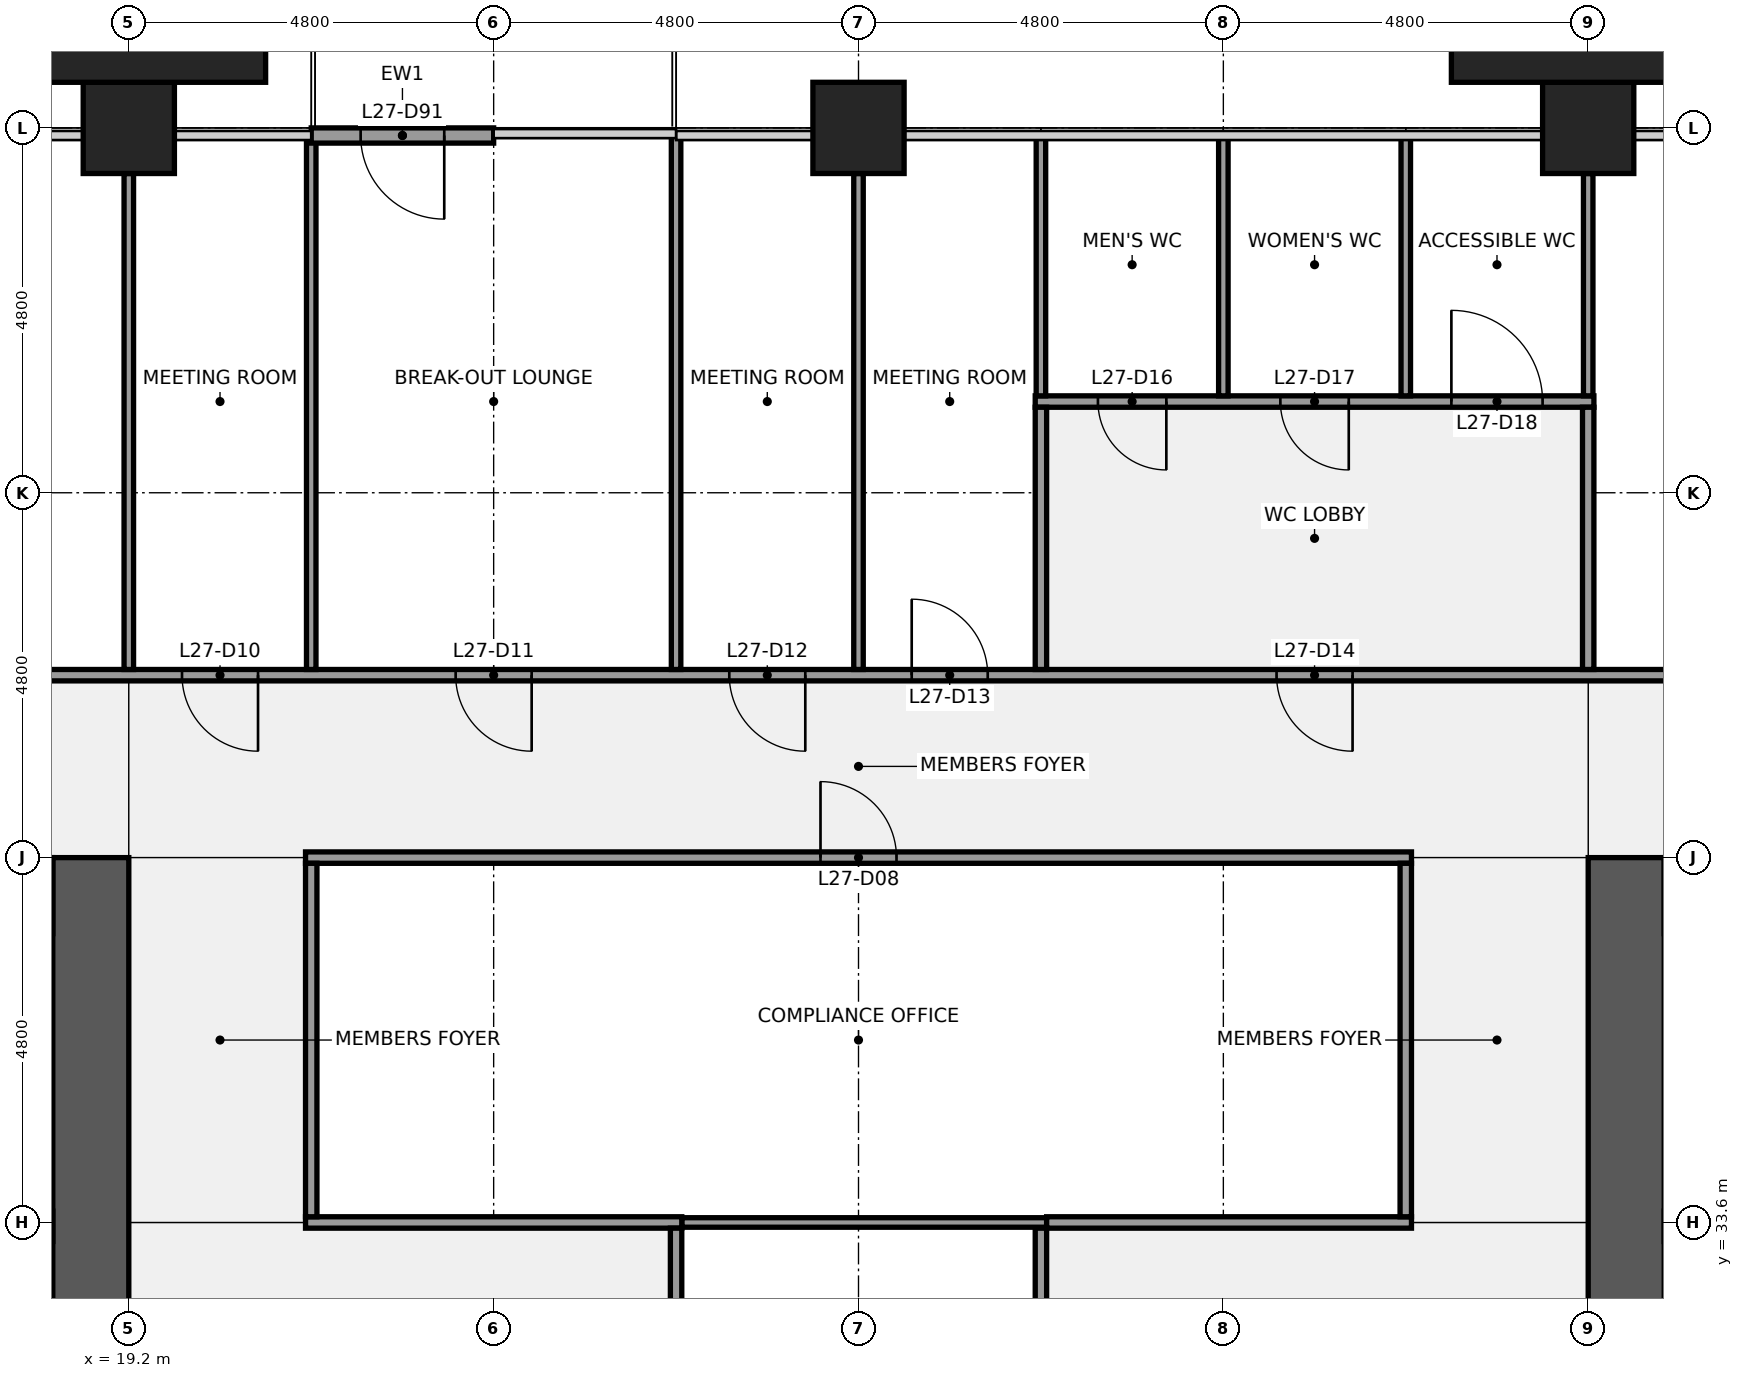
"""IFC4 building model, lengths in metres.
Left out: names, types, materials, properties, quantities, classifications, styles, units other than length and angle.
Written with IfcOpenShell. Run it as: python <this file> out.ifc"""

import sys

from ifc_helpers import new_model, si_unit, direction, frame, frame_2d, origin, origin_2d, place, context, subcontext, project, spatial, rectangle, extrude, element, fill, save


model = new_model("IFC4")
c1 = context("Model", 3, precision=1e-05, world=origin(), true_north=direction((0.0, 1.0)))
c2 = subcontext(c1, "Body", "Model", "MODEL_VIEW")
j1 = project(units=[si_unit("LENGTHUNIT", "METRE"), si_unit("PLANEANGLEUNIT", "RADIAN")], contexts=[c1])
p1 = place(None, origin())
s1 = spatial("IfcSite", under=j1, at=p1, CompositionType="ELEMENT")
p2 = place(p1, origin())
s2 = spatial("IfcBuilding", under=s1, at=p2, CompositionType="ELEMENT")
p3 = place(p2, frame((0.0, 0.0, 128.1)))
s3 = spatial("IfcBuildingStorey", under=s2, at=p3, CompositionType="ELEMENT", Elevation=128.1)
for number, where, z_axis, x_axis in (
    (1, (19.2, 48.0, 0.0), (0.0, 0.0, 1.0), (1.0, 0.0, 0.0)),
    (2, (28.8, 48.0, 0.0), (0.0, 0.0, 1.0), (1.0, 0.0, 0.0)),
    (3, (38.4, 48.0, 0.0), (0.0, 0.0, 1.0), (1.0, 0.0, 0.0)),
):
    element("IfcColumn", number, at=place(p3, frame(where, z_axis=z_axis, x_axis=x_axis)), inside=s3, PredefinedType="COLUMN", context=c2, shape_type="SweptSolid", body=[
        extrude(rectangle(XDim=1.2, YDim=1.2, at=origin_2d()), origin(), (0.0, 0.0, 1.0), 4.0),
    ])
p4 = place(p3, frame((18.7, 38.4, 0.0), z_axis=(0.0, 0.0, 1.0), x_axis=(0.0, -1.0, 0.0)))
e4 = element("IfcWall", 4, at=p4, inside=s3, PredefinedType="SHEAR", context=c2, shape_type="SweptSolid", body=[
    extrude(rectangle(XDim=28.8, YDim=1.0, at=frame_2d((14.4, 0.0))), origin(), (0.0, 0.0, 1.0), 3.84),
])
p5 = place(p4, frame((18.3, 0.0, 0.0)))
e5 = element("IfcOpeningElement", 5, at=p5, cuts=e4, PredefinedType="OPENING", context=c2, shape_type="SweptSolid", body=[
    extrude(rectangle(XDim=1.8, YDim=2.1, at=frame_2d((0.9, 1.05))), frame((0.0, 0.51, 0.0), z_axis=(0.0, -1.0, 0.0), x_axis=(1.0, 0.0, 0.0)), (0.0, 0.0, 1.0), 1.02),
])
p6 = place(p4, frame((8.7, 0.0, 0.0)))
e6 = element("IfcOpeningElement", 6, at=p6, cuts=e4, PredefinedType="OPENING", context=c2, shape_type="SweptSolid", body=[
    extrude(rectangle(XDim=1.8, YDim=2.1, at=frame_2d((0.9, 1.05))), frame((0.0, 0.51, 0.0), z_axis=(0.0, -1.0, 0.0), x_axis=(1.0, 0.0, 0.0)), (0.0, 0.0, 1.0), 1.02),
])
p7 = place(p3, frame((1.0, 33.55, 0.0), z_axis=(0.0, 0.0, 1.0), x_axis=(1.0, 0.0, 0.0)))
e7 = element("IfcWall", 7, at=p7, inside=s3, PredefinedType="SHEAR", context=c2, shape_type="SweptSolid", body=[
    extrude(rectangle(XDim=17.2, YDim=0.4, at=frame_2d((8.6, 0.0))), origin(), (0.0, 0.0, 1.0), 3.84),
])
p8 = place(p3, frame((38.9, 9.6, 0.0), z_axis=(0.0, 0.0, 1.0), x_axis=(0.0, 1.0, 0.0)))
e8 = element("IfcWall", 8, at=p8, inside=s3, PredefinedType="SHEAR", context=c2, shape_type="SweptSolid", body=[
    extrude(rectangle(XDim=28.8, YDim=1.0, at=frame_2d((14.4, 0.0))), origin(), (0.0, 0.0, 1.0), 3.84),
])
p9 = place(p8, frame((8.7, 0.0, 0.0)))
e9 = element("IfcOpeningElement", 9, at=p9, cuts=e8, PredefinedType="OPENING", context=c2, shape_type="SweptSolid", body=[
    extrude(rectangle(XDim=1.8, YDim=2.1, at=frame_2d((0.9, 1.05))), frame((0.0, 0.51, 0.0), z_axis=(0.0, -1.0, 0.0), x_axis=(1.0, 0.0, 0.0)), (0.0, 0.0, 1.0), 1.02),
])
p10 = place(p8, frame((18.3, 0.0, 0.0)))
e10 = element("IfcOpeningElement", 10, at=p10, cuts=e8, PredefinedType="OPENING", context=c2, shape_type="SweptSolid", body=[
    extrude(rectangle(XDim=1.8, YDim=2.1, at=frame_2d((0.9, 1.05))), frame((0.0, 0.51, 0.0), z_axis=(0.0, -1.0, 0.0), x_axis=(1.0, 0.0, 0.0)), (0.0, 0.0, 1.0), 1.02),
])
p11 = place(p3, frame((26.475, 33.6, 0.0), z_axis=(0.0, 0.0, 1.0), x_axis=(1.0, 0.0, 0.0)))
e11 = element("IfcWall", 11, at=p11, inside=s3, PredefinedType="PARTITIONING", context=c2, shape_type="SweptSolid", body=[
    extrude(rectangle(XDim=4.8, YDim=0.125, at=frame_2d((2.4, 0.0))), origin(), (0.0, 0.0, 1.0), 2.936),
])
p12 = place(p3, frame((21.525, 33.6, 0.0), z_axis=(0.0, 0.0, 1.0), x_axis=(1.0, 0.0, 0.0)))
e12 = element("IfcWall", 12, at=p12, inside=s3, PredefinedType="PARTITIONING", context=c2, shape_type="SweptSolid", body=[
    extrude(rectangle(XDim=4.95, YDim=0.15, at=frame_2d((2.475, 0.0))), origin(), (0.0, 0.0, 1.0), 2.936),
])
p13 = place(p3, frame((31.275, 33.6, 0.0), z_axis=(0.0, 0.0, 1.0), x_axis=(1.0, 0.0, 0.0)))
e13 = element("IfcWall", 13, at=p13, inside=s3, PredefinedType="PARTITIONING", context=c2, shape_type="SweptSolid", body=[
    extrude(rectangle(XDim=4.8, YDim=0.15, at=frame_2d((2.4, 0.0))), origin(), (0.0, 0.0, 1.0), 2.936),
])
p14 = place(p3, frame((21.525, 38.4, 0.0), z_axis=(0.0, 0.0, 1.0), x_axis=(1.0, 0.0, 0.0)))
e14 = element("IfcWall", 14, at=p14, inside=s3, PredefinedType="PARTITIONING", context=c2, shape_type="SweptSolid", body=[
    extrude(rectangle(XDim=14.55, YDim=0.15, at=frame_2d((7.275, 0.0))), origin(), (0.0, 0.0, 1.0), 2.936),
])
p15 = place(p14, frame((6.775, 0.0, 0.0)))
e15 = element("IfcOpeningElement", 15, at=p15, cuts=e14, PredefinedType="OPENING", context=c2, shape_type="SweptSolid", body=[
    extrude(rectangle(XDim=1.0, YDim=2.1, at=frame_2d((0.5, 1.05))), frame((0.0, 0.085, 0.0), z_axis=(0.0, -1.0, 0.0), x_axis=(1.0, 0.0, 0.0)), (0.0, 0.0, 1.0), 0.17),
])
p16 = place(p3, frame((14.325, 40.8, 0.0), z_axis=(0.0, 0.0, 1.0), x_axis=(1.0, 0.0, 0.0)))
e16 = element("IfcWall", 16, at=p16, inside=s3, PredefinedType="PARTITIONING", context=c2, shape_type="SweptSolid", body=[
    extrude(rectangle(XDim=28.95, YDim=0.15, at=frame_2d((14.475, 0.0))), origin(), (0.0, 0.0, 1.0), 2.936),
])
p17 = place(p16, frame((1.975, 0.0, 0.0)))
e17 = element("IfcOpeningElement", 17, at=p17, cuts=e16, PredefinedType="OPENING", context=c2, shape_type="SweptSolid", body=[
    extrude(rectangle(XDim=1.0, YDim=2.1, at=frame_2d((0.5, 1.05))), frame((0.0, 0.085, 0.0), z_axis=(0.0, -1.0, 0.0), x_axis=(1.0, 0.0, 0.0)), (0.0, 0.0, 1.0), 0.17),
])
p18 = place(p16, frame((5.575, 0.0, 0.0)))
e18 = element("IfcOpeningElement", 18, at=p18, cuts=e16, PredefinedType="OPENING", context=c2, shape_type="SweptSolid", body=[
    extrude(rectangle(XDim=1.0, YDim=2.1, at=frame_2d((0.5, 1.05))), frame((0.0, 0.085, 0.0), z_axis=(0.0, -1.0, 0.0), x_axis=(1.0, 0.0, 0.0)), (0.0, 0.0, 1.0), 0.17),
])
p19 = place(p16, frame((9.175, 0.0, 0.0)))
e19 = element("IfcOpeningElement", 19, at=p19, cuts=e16, PredefinedType="OPENING", context=c2, shape_type="SweptSolid", body=[
    extrude(rectangle(XDim=1.0, YDim=2.1, at=frame_2d((0.5, 1.05))), frame((0.0, 0.085, 0.0), z_axis=(0.0, -1.0, 0.0), x_axis=(1.0, 0.0, 0.0)), (0.0, 0.0, 1.0), 0.17),
])
p20 = place(p16, frame((12.775, 0.0, 0.0)))
e20 = element("IfcOpeningElement", 20, at=p20, cuts=e16, PredefinedType="OPENING", context=c2, shape_type="SweptSolid", body=[
    extrude(rectangle(XDim=1.0, YDim=2.1, at=frame_2d((0.5, 1.05))), frame((0.0, 0.085, 0.0), z_axis=(0.0, -1.0, 0.0), x_axis=(1.0, 0.0, 0.0)), (0.0, 0.0, 1.0), 0.17),
])
p21 = place(p16, frame((15.175, 0.0, 0.0)))
e21 = element("IfcOpeningElement", 21, at=p21, cuts=e16, PredefinedType="OPENING", context=c2, shape_type="SweptSolid", body=[
    extrude(rectangle(XDim=1.0, YDim=2.1, at=frame_2d((0.5, 1.05))), frame((0.0, 0.085, 0.0), z_axis=(0.0, -1.0, 0.0), x_axis=(1.0, 0.0, 0.0)), (0.0, 0.0, 1.0), 0.17),
])
p22 = place(p16, frame((19.975, 0.0, 0.0)))
e22 = element("IfcOpeningElement", 22, at=p22, cuts=e16, PredefinedType="OPENING", context=c2, shape_type="SweptSolid", body=[
    extrude(rectangle(XDim=1.0, YDim=2.1, at=frame_2d((0.5, 1.05))), frame((0.0, 0.085, 0.0), z_axis=(0.0, -1.0, 0.0), x_axis=(1.0, 0.0, 0.0)), (0.0, 0.0, 1.0), 0.17),
])
p23 = place(p16, frame((25.975, 0.0, 0.0)))
e23 = element("IfcOpeningElement", 23, at=p23, cuts=e16, PredefinedType="OPENING", context=c2, shape_type="SweptSolid", body=[
    extrude(rectangle(XDim=1.0, YDim=2.1, at=frame_2d((0.5, 1.05))), frame((0.0, 0.085, 0.0), z_axis=(0.0, -1.0, 0.0), x_axis=(1.0, 0.0, 0.0)), (0.0, 0.0, 1.0), 0.17),
])
p24 = place(p3, frame((31.125, 44.4, 0.0), z_axis=(0.0, 0.0, 1.0), x_axis=(1.0, 0.0, 0.0)))
e24 = element("IfcWall", 24, at=p24, inside=s3, PredefinedType="PARTITIONING", context=c2, shape_type="SweptSolid", body=[
    extrude(rectangle(XDim=7.35, YDim=0.15, at=frame_2d((3.675, 0.0))), origin(), (0.0, 0.0, 1.0), 2.936),
])
p25 = place(p24, frame((0.825, 0.0, 0.0)))
e25 = element("IfcOpeningElement", 25, at=p25, cuts=e24, PredefinedType="OPENING", context=c2, shape_type="SweptSolid", body=[
    extrude(rectangle(XDim=0.9, YDim=2.1, at=frame_2d((0.45, 1.05))), frame((0.0, 0.085, 0.0), z_axis=(0.0, -1.0, 0.0), x_axis=(1.0, 0.0, 0.0)), (0.0, 0.0, 1.0), 0.17),
])
p26 = place(p24, frame((3.225, 0.0, 0.0)))
e26 = element("IfcOpeningElement", 26, at=p26, cuts=e24, PredefinedType="OPENING", context=c2, shape_type="SweptSolid", body=[
    extrude(rectangle(XDim=0.9, YDim=2.1, at=frame_2d((0.45, 1.05))), frame((0.0, 0.085, 0.0), z_axis=(0.0, -1.0, 0.0), x_axis=(1.0, 0.0, 0.0)), (0.0, 0.0, 1.0), 0.17),
])
p27 = place(p24, frame((5.475, 0.0, 0.0)))
e27 = element("IfcOpeningElement", 27, at=p27, cuts=e24, PredefinedType="OPENING", context=c2, shape_type="SweptSolid", body=[
    extrude(rectangle(XDim=1.2, YDim=2.1, at=frame_2d((0.6, 1.05))), frame((0.0, 0.085, 0.0), z_axis=(0.0, -1.0, 0.0), x_axis=(1.0, 0.0, 0.0)), (0.0, 0.0, 1.0), 0.17),
])
p28 = place(p3, frame((19.2, 40.875, 0.0), z_axis=(0.0, 0.0, 1.0), x_axis=(0.0, 1.0, 0.0)))
e28 = element("IfcWall", 28, at=p28, inside=s3, PredefinedType="PARTITIONING", context=c2, shape_type="SweptSolid", body=[
    extrude(rectangle(XDim=6.525, YDim=0.125, at=frame_2d((3.262, 0.0))), origin(), (0.0, 0.0, 1.0), 2.936),
])
p29 = place(p3, frame((21.6, 40.875, 0.0), z_axis=(0.0, 0.0, 1.0), x_axis=(0.0, 1.0, 0.0)))
e29 = element("IfcWall", 29, at=p29, inside=s3, PredefinedType="PARTITIONING", context=c2, shape_type="SweptSolid", body=[
    extrude(rectangle(XDim=7.025, YDim=0.125, at=frame_2d((3.512, 0.0))), origin(), (0.0, 0.0, 1.0), 2.936),
])
p30 = place(p3, frame((21.6, 33.675, 0.0), z_axis=(0.0, 0.0, 1.0), x_axis=(0.0, 1.0, 0.0)))
e30 = element("IfcWall", 30, at=p30, inside=s3, PredefinedType="PARTITIONING", context=c2, shape_type="SweptSolid", body=[
    extrude(rectangle(XDim=4.65, YDim=0.15, at=frame_2d((2.325, 0.0))), origin(), (0.0, 0.0, 1.0), 2.936),
])
p31 = place(p3, frame((26.4, 40.875, 0.0), z_axis=(0.0, 0.0, 1.0), x_axis=(0.0, 1.0, 0.0)))
e31 = element("IfcWall", 31, at=p31, inside=s3, PredefinedType="PARTITIONING", context=c2, shape_type="SweptSolid", body=[
    extrude(rectangle(XDim=7.025, YDim=0.125, at=frame_2d((3.512, 0.0))), origin(), (0.0, 0.0, 1.0), 2.936),
])
p32 = place(p3, frame((26.4, 27.675, 0.0), z_axis=(0.0, 0.0, 1.0), x_axis=(0.0, 1.0, 0.0)))
e32 = element("IfcWall", 32, at=p32, inside=s3, PredefinedType="PARTITIONING", context=c2, shape_type="SweptSolid", body=[
    extrude(rectangle(XDim=5.85, YDim=0.15, at=frame_2d((2.925, 0.0))), origin(), (0.0, 0.0, 1.0), 2.936),
])
p33 = place(p32, frame((2.425, 0.0, 0.0)))
e33 = element("IfcOpeningElement", 33, at=p33, cuts=e32, PredefinedType="OPENING", context=c2, shape_type="SweptSolid", body=[
    extrude(rectangle(XDim=1.0, YDim=2.1, at=frame_2d((0.5, 1.05))), frame((0.0, 0.085, 0.0), z_axis=(0.0, -1.0, 0.0), x_axis=(1.0, 0.0, 0.0)), (0.0, 0.0, 1.0), 0.17),
])
p34 = place(p3, frame((28.8, 40.875, 0.0), z_axis=(0.0, 0.0, 1.0), x_axis=(0.0, 1.0, 0.0)))
e34 = element("IfcWall", 34, at=p34, inside=s3, PredefinedType="PARTITIONING", context=c2, shape_type="SweptSolid", body=[
    extrude(rectangle(XDim=6.525, YDim=0.125, at=frame_2d((3.262, 0.0))), origin(), (0.0, 0.0, 1.0), 2.936),
])
p35 = place(p3, frame((31.2, 44.475, 0.0), z_axis=(0.0, 0.0, 1.0), x_axis=(0.0, 1.0, 0.0)))
e35 = element("IfcWall", 35, at=p35, inside=s3, PredefinedType="PARTITIONING", context=c2, shape_type="SweptSolid", body=[
    extrude(rectangle(XDim=3.425, YDim=0.125, at=frame_2d((1.712, 0.0))), origin(), (0.0, 0.0, 1.0), 2.936),
])
p36 = place(p3, frame((31.2, 27.675, 0.0), z_axis=(0.0, 0.0, 1.0), x_axis=(0.0, 1.0, 0.0)))
e36 = element("IfcWall", 36, at=p36, inside=s3, PredefinedType="PARTITIONING", context=c2, shape_type="SweptSolid", body=[
    extrude(rectangle(XDim=5.85, YDim=0.15, at=frame_2d((2.925, 0.0))), origin(), (0.0, 0.0, 1.0), 2.936),
])
p37 = place(p3, frame((31.2, 40.875, 0.0), z_axis=(0.0, 0.0, 1.0), x_axis=(0.0, 1.0, 0.0)))
e37 = element("IfcWall", 37, at=p37, inside=s3, PredefinedType="PARTITIONING", context=c2, shape_type="SweptSolid", body=[
    extrude(rectangle(XDim=3.45, YDim=0.15, at=frame_2d((1.725, 0.0))), origin(), (0.0, 0.0, 1.0), 2.936),
])
for number, where, z_axis, x_axis in (
    (38, (33.6, 44.475, 0.0), (0.0, 0.0, 1.0), (0.0, 1.0, 0.0)),
    (39, (36.0, 44.475, 0.0), (0.0, 0.0, 1.0), (0.0, 1.0, 0.0)),
):
    element("IfcWall", number, at=place(p3, frame(where, z_axis=z_axis, x_axis=x_axis)), inside=s3, PredefinedType="PARTITIONING", context=c2, shape_type="SweptSolid", body=[
        extrude(rectangle(XDim=3.425, YDim=0.125, at=frame_2d((1.712, 0.0))), origin(), (0.0, 0.0, 1.0), 2.936),
    ])
p38 = place(p3, frame((36.0, 33.675, 0.0), z_axis=(0.0, 0.0, 1.0), x_axis=(0.0, 1.0, 0.0)))
e40 = element("IfcWall", 40, at=p38, inside=s3, PredefinedType="PARTITIONING", context=c2, shape_type="SweptSolid", body=[
    extrude(rectangle(XDim=4.65, YDim=0.15, at=frame_2d((2.325, 0.0))), origin(), (0.0, 0.0, 1.0), 2.936),
])
p39 = place(p3, frame((38.4, 44.475, 0.0), z_axis=(0.0, 0.0, 1.0), x_axis=(0.0, 1.0, 0.0)))
e41 = element("IfcWall", 41, at=p39, inside=s3, PredefinedType="PARTITIONING", context=c2, shape_type="SweptSolid", body=[
    extrude(rectangle(XDim=2.925, YDim=0.125, at=frame_2d((1.462, 0.0))), origin(), (0.0, 0.0, 1.0), 2.936),
])
p40 = place(p3, frame((38.4, 40.875, 0.0), z_axis=(0.0, 0.0, 1.0), x_axis=(0.0, 1.0, 0.0)))
e42 = element("IfcWall", 42, at=p40, inside=s3, PredefinedType="PARTITIONING", context=c2, shape_type="SweptSolid", body=[
    extrude(rectangle(XDim=3.45, YDim=0.15, at=frame_2d((1.725, 0.0))), origin(), (0.0, 0.0, 1.0), 2.936),
])
p41 = place(p3, frame((24.0, 47.9, 0.0), z_axis=(0.0, 0.0, 1.0), x_axis=(-1.0, 0.0, 0.0)))
e43 = element("IfcWall", 43, at=p41, inside=s3, PredefinedType="SOLIDWALL", context=c2, shape_type="SweptSolid", body=[
    extrude(rectangle(XDim=2.4, YDim=0.2, at=frame_2d((1.2, 0.0))), origin(), (0.0, 0.0, 1.0), 3.314),
])
p42 = place(p41, frame((0.65, 0.0, 0.0)))
e44 = element("IfcOpeningElement", 44, at=p42, cuts=e43, PredefinedType="OPENING", context=c2, shape_type="SweptSolid", body=[
    extrude(rectangle(XDim=1.1, YDim=2.1, at=frame_2d((0.55, 1.05))), frame((0.0, 0.11, 0.0), z_axis=(0.0, -1.0, 0.0), x_axis=(1.0, 0.0, 0.0)), (0.0, 0.0, 1.0), 0.22),
])
for number, where, z_axis, x_axis in (
    (45, (19.2, 49.05, 0.0), (0.0, 0.0, 1.0), (1.0, 0.0, 0.0)),
    (46, (38.4, 49.05, 0.0), (0.0, 0.0, 1.0), (1.0, 0.0, 0.0)),
):
    element("IfcColumn", number, at=place(p3, frame(where, z_axis=z_axis, x_axis=x_axis)), inside=s3, PredefinedType="PILASTER", context=c2, shape_type="SweptSolid", body=[
        extrude(rectangle(XDim=3.6, YDim=0.9, at=origin_2d()), origin(), (0.0, 0.0, 1.0), 4.0),
    ])
p43 = place(p15, origin())
e47 = element("IfcDoor", 47, at=p43, inside=s3, OperationType="SINGLE_SWING_LEFT", PredefinedType="DOOR", context=c2, shape_type="SweptSolid", body=[
    extrude(rectangle(XDim=1.0, YDim=2.1, at=frame_2d((0.5, 1.05))), frame((0.0, 0.025, 0.0), z_axis=(0.0, -1.0, 0.0), x_axis=(1.0, 0.0, 0.0)), (0.0, 0.0, 1.0), 0.05),
])
fill(e15, e47)
p44 = place(p18, origin())
e48 = element("IfcDoor", 48, at=p44, inside=s3, OperationType="SINGLE_SWING_RIGHT", PredefinedType="DOOR", context=c2, shape_type="SweptSolid", body=[
    extrude(rectangle(XDim=1.0, YDim=2.1, at=frame_2d((0.5, 1.05))), frame((0.0, 0.025, 0.0), z_axis=(0.0, -1.0, 0.0), x_axis=(1.0, 0.0, 0.0)), (0.0, 0.0, 1.0), 0.05),
])
fill(e18, e48)
p45 = place(p19, origin())
e49 = element("IfcDoor", 49, at=p45, inside=s3, OperationType="SINGLE_SWING_RIGHT", PredefinedType="DOOR", context=c2, shape_type="SweptSolid", body=[
    extrude(rectangle(XDim=1.0, YDim=2.1, at=frame_2d((0.5, 1.05))), frame((0.0, 0.025, 0.0), z_axis=(0.0, -1.0, 0.0), x_axis=(1.0, 0.0, 0.0)), (0.0, 0.0, 1.0), 0.05),
])
fill(e19, e49)
p46 = place(p20, origin())
e50 = element("IfcDoor", 50, at=p46, inside=s3, OperationType="SINGLE_SWING_RIGHT", PredefinedType="DOOR", context=c2, shape_type="SweptSolid", body=[
    extrude(rectangle(XDim=1.0, YDim=2.1, at=frame_2d((0.5, 1.05))), frame((0.0, 0.025, 0.0), z_axis=(0.0, -1.0, 0.0), x_axis=(1.0, 0.0, 0.0)), (0.0, 0.0, 1.0), 0.05),
])
fill(e20, e50)
p47 = place(p21, origin())
e51 = element("IfcDoor", 51, at=p47, inside=s3, OperationType="SINGLE_SWING_LEFT", PredefinedType="DOOR", context=c2, shape_type="SweptSolid", body=[
    extrude(rectangle(XDim=1.0, YDim=2.1, at=frame_2d((0.5, 1.05))), frame((0.0, 0.025, 0.0), z_axis=(0.0, -1.0, 0.0), x_axis=(1.0, 0.0, 0.0)), (0.0, 0.0, 1.0), 0.05),
])
fill(e21, e51)
p48 = place(p22, origin())
e52 = element("IfcDoor", 52, at=p48, inside=s3, OperationType="SINGLE_SWING_RIGHT", PredefinedType="DOOR", context=c2, shape_type="SweptSolid", body=[
    extrude(rectangle(XDim=1.0, YDim=2.1, at=frame_2d((0.5, 1.05))), frame((0.0, 0.025, 0.0), z_axis=(0.0, -1.0, 0.0), x_axis=(1.0, 0.0, 0.0)), (0.0, 0.0, 1.0), 0.05),
])
fill(e22, e52)
p49 = place(p25, origin())
e53 = element("IfcDoor", 53, at=p49, inside=s3, OperationType="SINGLE_SWING_RIGHT", PredefinedType="DOOR", context=c2, shape_type="SweptSolid", body=[
    extrude(rectangle(XDim=0.9, YDim=2.1, at=frame_2d((0.45, 1.05))), frame((0.0, 0.025, 0.0), z_axis=(0.0, -1.0, 0.0), x_axis=(1.0, 0.0, 0.0)), (0.0, 0.0, 1.0), 0.05),
])
fill(e25, e53)
p50 = place(p26, origin())
e54 = element("IfcDoor", 54, at=p50, inside=s3, OperationType="SINGLE_SWING_RIGHT", PredefinedType="DOOR", context=c2, shape_type="SweptSolid", body=[
    extrude(rectangle(XDim=0.9, YDim=2.1, at=frame_2d((0.45, 1.05))), frame((0.0, 0.025, 0.0), z_axis=(0.0, -1.0, 0.0), x_axis=(1.0, 0.0, 0.0)), (0.0, 0.0, 1.0), 0.05),
])
fill(e26, e54)
p51 = place(p27, origin())
e55 = element("IfcDoor", 55, at=p51, inside=s3, OperationType="SINGLE_SWING_LEFT", PredefinedType="DOOR", context=c2, shape_type="SweptSolid", body=[
    extrude(rectangle(XDim=1.2, YDim=2.1, at=frame_2d((0.6, 1.05))), frame((0.0, 0.025, 0.0), z_axis=(0.0, -1.0, 0.0), x_axis=(1.0, 0.0, 0.0)), (0.0, 0.0, 1.0), 0.05),
])
fill(e27, e55)
p52 = place(p42, origin())
e56 = element("IfcDoor", 56, at=p52, inside=s3, OperationType="SINGLE_SWING_LEFT", PredefinedType="DOOR", context=c2, shape_type="SweptSolid", body=[
    extrude(rectangle(XDim=1.1, YDim=2.1, at=frame_2d((0.55, 1.05))), frame((0.0, 0.025, 0.0), z_axis=(0.0, -1.0, 0.0), x_axis=(1.0, 0.0, 0.0)), (0.0, 0.0, 1.0), 0.05),
])
fill(e44, e56)
save(model, sys.argv[1])
